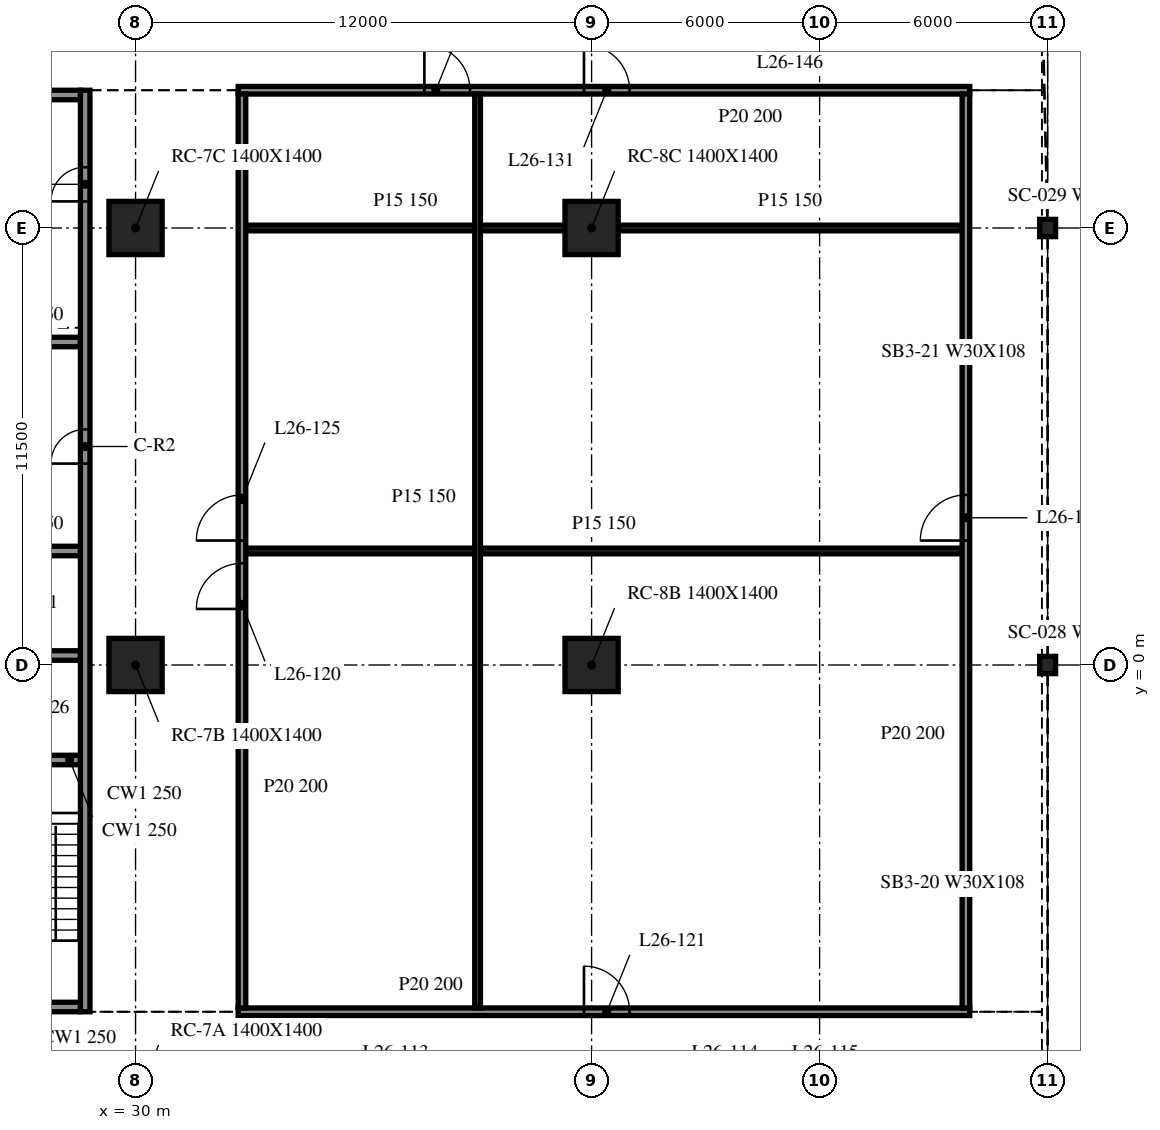
"""IFC4 building model, lengths in metres.
Left out: names, types, materials, properties, quantities, classifications, styles, units other than length and angle.
Written with IfcOpenShell. Run it as: python <this file> out.ifc"""

import sys

from ifc_helpers import new_model, si_unit, direction, frame, frame_2d, origin, origin_2d, place, context, subcontext, project, spatial, rectangle, i_section, extrude, element, fill, save


model = new_model("IFC4")
c1 = context("Model", 3, precision=1e-05, world=origin(), true_north=direction((0.0, 1.0)))
c2 = subcontext(c1, "Body", "Model", "MODEL_VIEW")
j1 = project(units=[si_unit("LENGTHUNIT", "METRE"), si_unit("PLANEANGLEUNIT", "RADIAN")], contexts=[c1])
p1 = place(None, origin())
s1 = spatial("IfcSite", under=j1, at=p1, CompositionType="ELEMENT")
p2 = place(p1, origin())
s2 = spatial("IfcBuilding", under=s1, at=p2, CompositionType="ELEMENT")
p3 = place(p2, frame((0.0, 0.0, 113.5)))
s3 = spatial("IfcBuildingStorey", under=s2, at=p3, CompositionType="ELEMENT", Elevation=113.5)
for number, where, z_axis, x_axis in (
    (1, (30.0, 0.0, -0.34), (0.0, 0.0, 1.0), (1.0, 0.0, 0.0)),
    (2, (30.0, 11.5, -0.34), (0.0, 0.0, 1.0), (1.0, 0.0, 0.0)),
    (3, (42.0, 0.0, -0.34), (0.0, 0.0, 1.0), (1.0, 0.0, 0.0)),
    (4, (42.0, 11.5, -0.34), (0.0, 0.0, 1.0), (1.0, 0.0, 0.0)),
):
    element("IfcColumn", number, at=place(p3, frame(where, z_axis=z_axis, x_axis=x_axis)), inside=s3, PredefinedType="COLUMN", context=c2, shape_type="SweptSolid", body=[
        extrude(rectangle(XDim=1.4, YDim=1.4, at=origin_2d()), origin(), (0.0, 0.0, 1.0), 3.89),
    ])
for number, where, z_axis, x_axis in (
    (5, (54.0, 0.0, -0.34), (0.0, 0.0, 1.0), (1.0, 0.0, 0.0)),
    (6, (54.0, 11.5, -0.34), (0.0, 0.0, 1.0), (1.0, 0.0, 0.0)),
):
    element("IfcColumn", number, at=place(p3, frame(where, z_axis=z_axis, x_axis=x_axis)), inside=s3, PredefinedType="COLUMN", context=c2, shape_type="SweptSolid", body=[
        extrude(i_section(OverallWidth=0.419, OverallDepth=0.455, WebThickness=0.042, FlangeThickness=0.068, at=origin_2d()), origin(), (0.0, 0.0, 1.0), 3.89),
    ])
p4 = place(p3, frame((28.675, -9.125, 0.0), z_axis=(0.0, 0.0, 1.0), x_axis=(0.0, 1.0, 0.0)))
e7 = element("IfcWall", 7, at=p4, inside=s3, PredefinedType="SOLIDWALL", context=c2, shape_type="SweptSolid", body=[
    extrude(rectangle(XDim=24.25, YDim=0.25, at=frame_2d((12.125, 0.0))), origin(), (0.0, 0.0, 1.0), 3.55),
])
p5 = place(p4, frame((14.425, 0.0, 0.0)))
e8 = element("IfcOpeningElement", 8, at=p5, cuts=e7, PredefinedType="OPENING", context=c2, shape_type="SweptSolid", body=[
    extrude(rectangle(XDim=0.9, YDim=2.1, at=frame_2d((0.45, 1.05))), frame((0.0, 0.135, 0.0), z_axis=(0.0, -1.0, 0.0), x_axis=(1.0, 0.0, 0.0)), (0.0, 0.0, 1.0), 0.27),
])
p6 = place(p4, frame((21.325, 0.0, 0.0)))
e9 = element("IfcOpeningElement", 9, at=p6, cuts=e7, PredefinedType="OPENING", context=c2, shape_type="SweptSolid", body=[
    extrude(rectangle(XDim=0.9, YDim=2.1, at=frame_2d((0.45, 1.05))), frame((0.0, 0.135, 0.0), z_axis=(0.0, -1.0, 0.0), x_axis=(1.0, 0.0, 0.0)), (0.0, 0.0, 1.0), 0.27),
])
p7 = place(p3, frame((28.55, -9.0, 0.0), z_axis=(0.0, 0.0, 1.0), x_axis=(-1.0, 0.0, 0.0)))
e10 = element("IfcWall", 10, at=p7, inside=s3, PredefinedType="SOLIDWALL", context=c2, shape_type="SweptSolid", body=[
    extrude(rectangle(XDim=9.1, YDim=0.25, at=frame_2d((4.55, 0.0))), origin(), (0.0, 0.0, 1.0), 3.55),
])
p8 = place(p7, frame((3.65, 0.0, 0.0)))
e11 = element("IfcOpeningElement", 11, at=p8, cuts=e10, PredefinedType="OPENING", context=c2, shape_type="SweptSolid", body=[
    extrude(rectangle(XDim=1.8, YDim=2.1, at=frame_2d((0.9, 1.05))), frame((0.0, 0.135, 0.0), z_axis=(0.0, -1.0, 0.0), x_axis=(1.0, 0.0, 0.0)), (0.0, 0.0, 1.0), 0.27),
])
p9 = place(p3, frame((19.45, 15.0, 0.0), z_axis=(0.0, 0.0, 1.0), x_axis=(1.0, 0.0, 0.0)))
e12 = element("IfcWall", 12, at=p9, inside=s3, PredefinedType="SOLIDWALL", context=c2, shape_type="SweptSolid", body=[
    extrude(rectangle(XDim=9.1, YDim=0.25, at=frame_2d((4.55, 0.0))), origin(), (0.0, 0.0, 1.0), 3.55),
])
p10 = place(p9, frame((3.65, 0.0, 0.0)))
e13 = element("IfcOpeningElement", 13, at=p10, cuts=e12, PredefinedType="OPENING", context=c2, shape_type="SweptSolid", body=[
    extrude(rectangle(XDim=1.8, YDim=2.1, at=frame_2d((0.9, 1.05))), frame((0.0, 0.135, 0.0), z_axis=(0.0, -1.0, 0.0), x_axis=(1.0, 0.0, 0.0)), (0.0, 0.0, 1.0), 0.27),
])
for number, where, z_axis, x_axis in (
    (14, (25.7, -2.5, 0.0), (0.0, 0.0, 1.0), (1.0, 0.0, 0.0)),
    (15, (25.7, 0.25, 0.0), (0.0, 0.0, 1.0), (1.0, 0.0, 0.0)),
    (16, (25.7, 3.0, 0.0), (0.0, 0.0, 1.0), (1.0, 0.0, 0.0)),
    (17, (25.7, 8.5, 0.0), (0.0, 0.0, 1.0), (1.0, 0.0, 0.0)),
):
    element("IfcWall", number, at=place(p3, frame(where, z_axis=z_axis, x_axis=x_axis)), inside=s3, PredefinedType="SOLIDWALL", context=c2, shape_type="SweptSolid", body=[
        extrude(rectangle(XDim=2.85, YDim=0.25, at=frame_2d((1.425, 0.0))), origin(), (0.0, 0.0, 1.0), 3.55),
    ])
p11 = place(p3, frame((32.7, -9.125, 0.0), z_axis=(0.0, 0.0, 1.0), x_axis=(1.0, 0.0, 0.0)))
e18 = element("IfcWall", 18, at=p11, inside=s3, PredefinedType="PARTITIONING", context=c2, shape_type="SweptSolid", body=[
    extrude(rectangle(XDim=19.25, YDim=0.2, at=frame_2d((9.625, 0.0))), origin(), (0.0, 0.0, 1.0), 3.55),
])
p12 = place(p11, frame((9.1, 0.0, 0.0)))
e19 = element("IfcOpeningElement", 19, at=p12, cuts=e18, PredefinedType="OPENING", context=c2, shape_type="SweptSolid", body=[
    extrude(rectangle(XDim=1.2, YDim=2.1, at=frame_2d((0.6, 1.05))), frame((0.0, 0.11, 0.0), z_axis=(0.0, -1.0, 0.0), x_axis=(1.0, 0.0, 0.0)), (0.0, 0.0, 1.0), 0.22),
])
p13 = place(p3, frame((32.9, 3.0, 0.0), z_axis=(0.0, 0.0, 1.0), x_axis=(1.0, 0.0, 0.0)))
e20 = element("IfcWall", 20, at=p13, inside=s3, PredefinedType="PARTITIONING", context=c2, shape_type="SweptSolid", body=[
    extrude(rectangle(XDim=18.85, YDim=0.15, at=frame_2d((9.425, 0.0))), origin(), (0.0, 0.0, 1.0), 3.55),
])
p14 = place(p3, frame((32.9, 11.5, 0.0), z_axis=(0.0, 0.0, 1.0), x_axis=(1.0, 0.0, 0.0)))
e21 = element("IfcWall", 21, at=p14, inside=s3, PredefinedType="PARTITIONING", context=c2, shape_type="SweptSolid", body=[
    extrude(rectangle(XDim=8.4, YDim=0.15, at=frame_2d((4.2, 0.0))), origin(), (0.0, 0.0, 1.0), 2.551),
])
p15 = place(p3, frame((42.7, 11.5, 0.0), z_axis=(0.0, 0.0, 1.0), x_axis=(1.0, 0.0, 0.0)))
e22 = element("IfcWall", 22, at=p15, inside=s3, PredefinedType="PARTITIONING", context=c2, shape_type="SweptSolid", body=[
    extrude(rectangle(XDim=9.05, YDim=0.15, at=frame_2d((4.525, 0.0))), origin(), (0.0, 0.0, 1.0), 2.551),
])
p16 = place(p3, frame((32.7, 15.125, 0.0), z_axis=(0.0, 0.0, 1.0), x_axis=(1.0, 0.0, 0.0)))
e23 = element("IfcWall", 23, at=p16, inside=s3, PredefinedType="PARTITIONING", context=c2, shape_type="SweptSolid", body=[
    extrude(rectangle(XDim=19.25, YDim=0.2, at=frame_2d((9.625, 0.0))), origin(), (0.0, 0.0, 1.0), 3.55),
])
p17 = place(p16, frame((4.9, 0.0, 0.0)))
e24 = element("IfcOpeningElement", 24, at=p17, cuts=e23, PredefinedType="OPENING", context=c2, shape_type="SweptSolid", body=[
    extrude(rectangle(XDim=1.2, YDim=2.1, at=frame_2d((0.6, 1.05))), frame((0.0, 0.11, 0.0), z_axis=(0.0, -1.0, 0.0), x_axis=(1.0, 0.0, 0.0)), (0.0, 0.0, 1.0), 0.22),
])
p18 = place(p16, frame((9.1, 0.0, 0.0)))
e25 = element("IfcOpeningElement", 25, at=p18, cuts=e23, PredefinedType="OPENING", context=c2, shape_type="SweptSolid", body=[
    extrude(rectangle(XDim=1.2, YDim=2.1, at=frame_2d((0.6, 1.05))), frame((0.0, 0.11, 0.0), z_axis=(0.0, -1.0, 0.0), x_axis=(1.0, 0.0, 0.0)), (0.0, 0.0, 1.0), 0.22),
])
p19 = place(p3, frame((32.8, -9.025, 0.0), z_axis=(0.0, 0.0, 1.0), x_axis=(0.0, 1.0, 0.0)))
e26 = element("IfcWall", 26, at=p19, inside=s3, PredefinedType="PARTITIONING", context=c2, shape_type="SweptSolid", body=[
    extrude(rectangle(XDim=24.05, YDim=0.2, at=frame_2d((12.025, 0.0))), origin(), (0.0, 0.0, 1.0), 3.55),
])
p20 = place(p19, frame((10.5, 0.0, 0.0)))
e27 = element("IfcOpeningElement", 27, at=p20, cuts=e26, PredefinedType="OPENING", context=c2, shape_type="SweptSolid", body=[
    extrude(rectangle(XDim=1.2, YDim=2.1, at=frame_2d((0.6, 1.05))), frame((0.0, 0.11, 0.0), z_axis=(0.0, -1.0, 0.0), x_axis=(1.0, 0.0, 0.0)), (0.0, 0.0, 1.0), 0.22),
])
p21 = place(p19, frame((12.3, 0.0, 0.0)))
e28 = element("IfcOpeningElement", 28, at=p21, cuts=e26, PredefinedType="OPENING", context=c2, shape_type="SweptSolid", body=[
    extrude(rectangle(XDim=1.2, YDim=2.1, at=frame_2d((0.6, 1.05))), frame((0.0, 0.11, 0.0), z_axis=(0.0, -1.0, 0.0), x_axis=(1.0, 0.0, 0.0)), (0.0, 0.0, 1.0), 0.22),
])
p22 = place(p3, frame((39.0, -9.025, 0.0), z_axis=(0.0, 0.0, 1.0), x_axis=(0.0, 1.0, 0.0)))
e29 = element("IfcWall", 29, at=p22, inside=s3, PredefinedType="PARTITIONING", context=c2, shape_type="SweptSolid", body=[
    extrude(rectangle(XDim=24.05, YDim=0.15, at=frame_2d((12.025, 0.0))), origin(), (0.0, 0.0, 1.0), 3.55),
])
p23 = place(p3, frame((51.85, -9.025, 0.0), z_axis=(0.0, 0.0, 1.0), x_axis=(0.0, 1.0, 0.0)))
e30 = element("IfcWall", 30, at=p23, inside=s3, PredefinedType="PARTITIONING", context=c2, shape_type="SweptSolid", body=[
    extrude(rectangle(XDim=24.05, YDim=0.2, at=frame_2d((12.025, 0.0))), origin(), (0.0, 0.0, 1.0), 3.55),
])
p24 = place(p23, frame((12.3, 0.0, 0.0)))
e31 = element("IfcOpeningElement", 31, at=p24, cuts=e30, PredefinedType="OPENING", context=c2, shape_type="SweptSolid", body=[
    extrude(rectangle(XDim=1.2, YDim=2.1, at=frame_2d((0.6, 1.05))), frame((0.0, 0.11, 0.0), z_axis=(0.0, -1.0, 0.0), x_axis=(1.0, 0.0, 0.0)), (0.0, 0.0, 1.0), 0.22),
])
p25 = place(p5, origin())
e32 = element("IfcDoor", 32, at=p25, inside=s3, OperationType="SINGLE_SWING_RIGHT", PredefinedType="DOOR", context=c2, shape_type="SweptSolid", body=[
    extrude(rectangle(XDim=0.9, YDim=2.1, at=frame_2d((0.45, 1.05))), frame((0.0, 0.025, 0.0), z_axis=(0.0, -1.0, 0.0), x_axis=(1.0, 0.0, 0.0)), (0.0, 0.0, 1.0), 0.05),
])
fill(e8, e32)
p26 = place(p6, origin())
e33 = element("IfcDoor", 33, at=p26, inside=s3, OperationType="SINGLE_SWING_LEFT", PredefinedType="DOOR", context=c2, shape_type="SweptSolid", body=[
    extrude(rectangle(XDim=0.9, YDim=2.1, at=frame_2d((0.45, 1.05))), frame((0.0, 0.025, 0.0), z_axis=(0.0, -1.0, 0.0), x_axis=(1.0, 0.0, 0.0)), (0.0, 0.0, 1.0), 0.05),
])
fill(e9, e33)
p27 = place(p20, origin())
e34 = element("IfcDoor", 34, at=p27, inside=s3, OperationType="SINGLE_SWING_RIGHT", PredefinedType="DOOR", context=c2, shape_type="SweptSolid", body=[
    extrude(rectangle(XDim=1.2, YDim=2.1, at=frame_2d((0.6, 1.05))), frame((0.0, 0.025, 0.0), z_axis=(0.0, -1.0, 0.0), x_axis=(1.0, 0.0, 0.0)), (0.0, 0.0, 1.0), 0.05),
])
fill(e27, e34)
p28 = place(p12, origin())
e35 = element("IfcDoor", 35, at=p28, inside=s3, OperationType="SINGLE_SWING_RIGHT", PredefinedType="DOOR", context=c2, shape_type="SweptSolid", body=[
    extrude(rectangle(XDim=1.2, YDim=2.1, at=frame_2d((0.6, 1.05))), frame((0.0, 0.025, 0.0), z_axis=(0.0, -1.0, 0.0), x_axis=(1.0, 0.0, 0.0)), (0.0, 0.0, 1.0), 0.05),
])
fill(e19, e35)
p29 = place(p21, origin())
e36 = element("IfcDoor", 36, at=p29, inside=s3, OperationType="SINGLE_SWING_LEFT", PredefinedType="DOOR", context=c2, shape_type="SweptSolid", body=[
    extrude(rectangle(XDim=1.2, YDim=2.1, at=frame_2d((0.6, 1.05))), frame((0.0, 0.025, 0.0), z_axis=(0.0, -1.0, 0.0), x_axis=(1.0, 0.0, 0.0)), (0.0, 0.0, 1.0), 0.05),
])
fill(e28, e36)
p30 = place(p24, origin())
e37 = element("IfcDoor", 37, at=p30, inside=s3, OperationType="SINGLE_SWING_RIGHT", PredefinedType="DOOR", context=c2, shape_type="SweptSolid", body=[
    extrude(rectangle(XDim=1.2, YDim=2.1, at=frame_2d((0.6, 1.05))), frame((0.0, 0.025, 0.0), z_axis=(0.0, -1.0, 0.0), x_axis=(1.0, 0.0, 0.0)), (0.0, 0.0, 1.0), 0.05),
])
fill(e31, e37)
p31 = place(p17, origin())
e38 = element("IfcDoor", 38, at=p31, inside=s3, OperationType="SINGLE_SWING_RIGHT", PredefinedType="DOOR", context=c2, shape_type="SweptSolid", body=[
    extrude(rectangle(XDim=1.2, YDim=2.1, at=frame_2d((0.6, 1.05))), frame((0.0, 0.025, 0.0), z_axis=(0.0, -1.0, 0.0), x_axis=(1.0, 0.0, 0.0)), (0.0, 0.0, 1.0), 0.05),
])
fill(e24, e38)
p32 = place(p18, origin())
e39 = element("IfcDoor", 39, at=p32, inside=s3, OperationType="SINGLE_SWING_LEFT", PredefinedType="DOOR", context=c2, shape_type="SweptSolid", body=[
    extrude(rectangle(XDim=1.2, YDim=2.1, at=frame_2d((0.6, 1.05))), frame((0.0, 0.025, 0.0), z_axis=(0.0, -1.0, 0.0), x_axis=(1.0, 0.0, 0.0)), (0.0, 0.0, 1.0), 0.05),
])
fill(e25, e39)
save(model, sys.argv[1])
